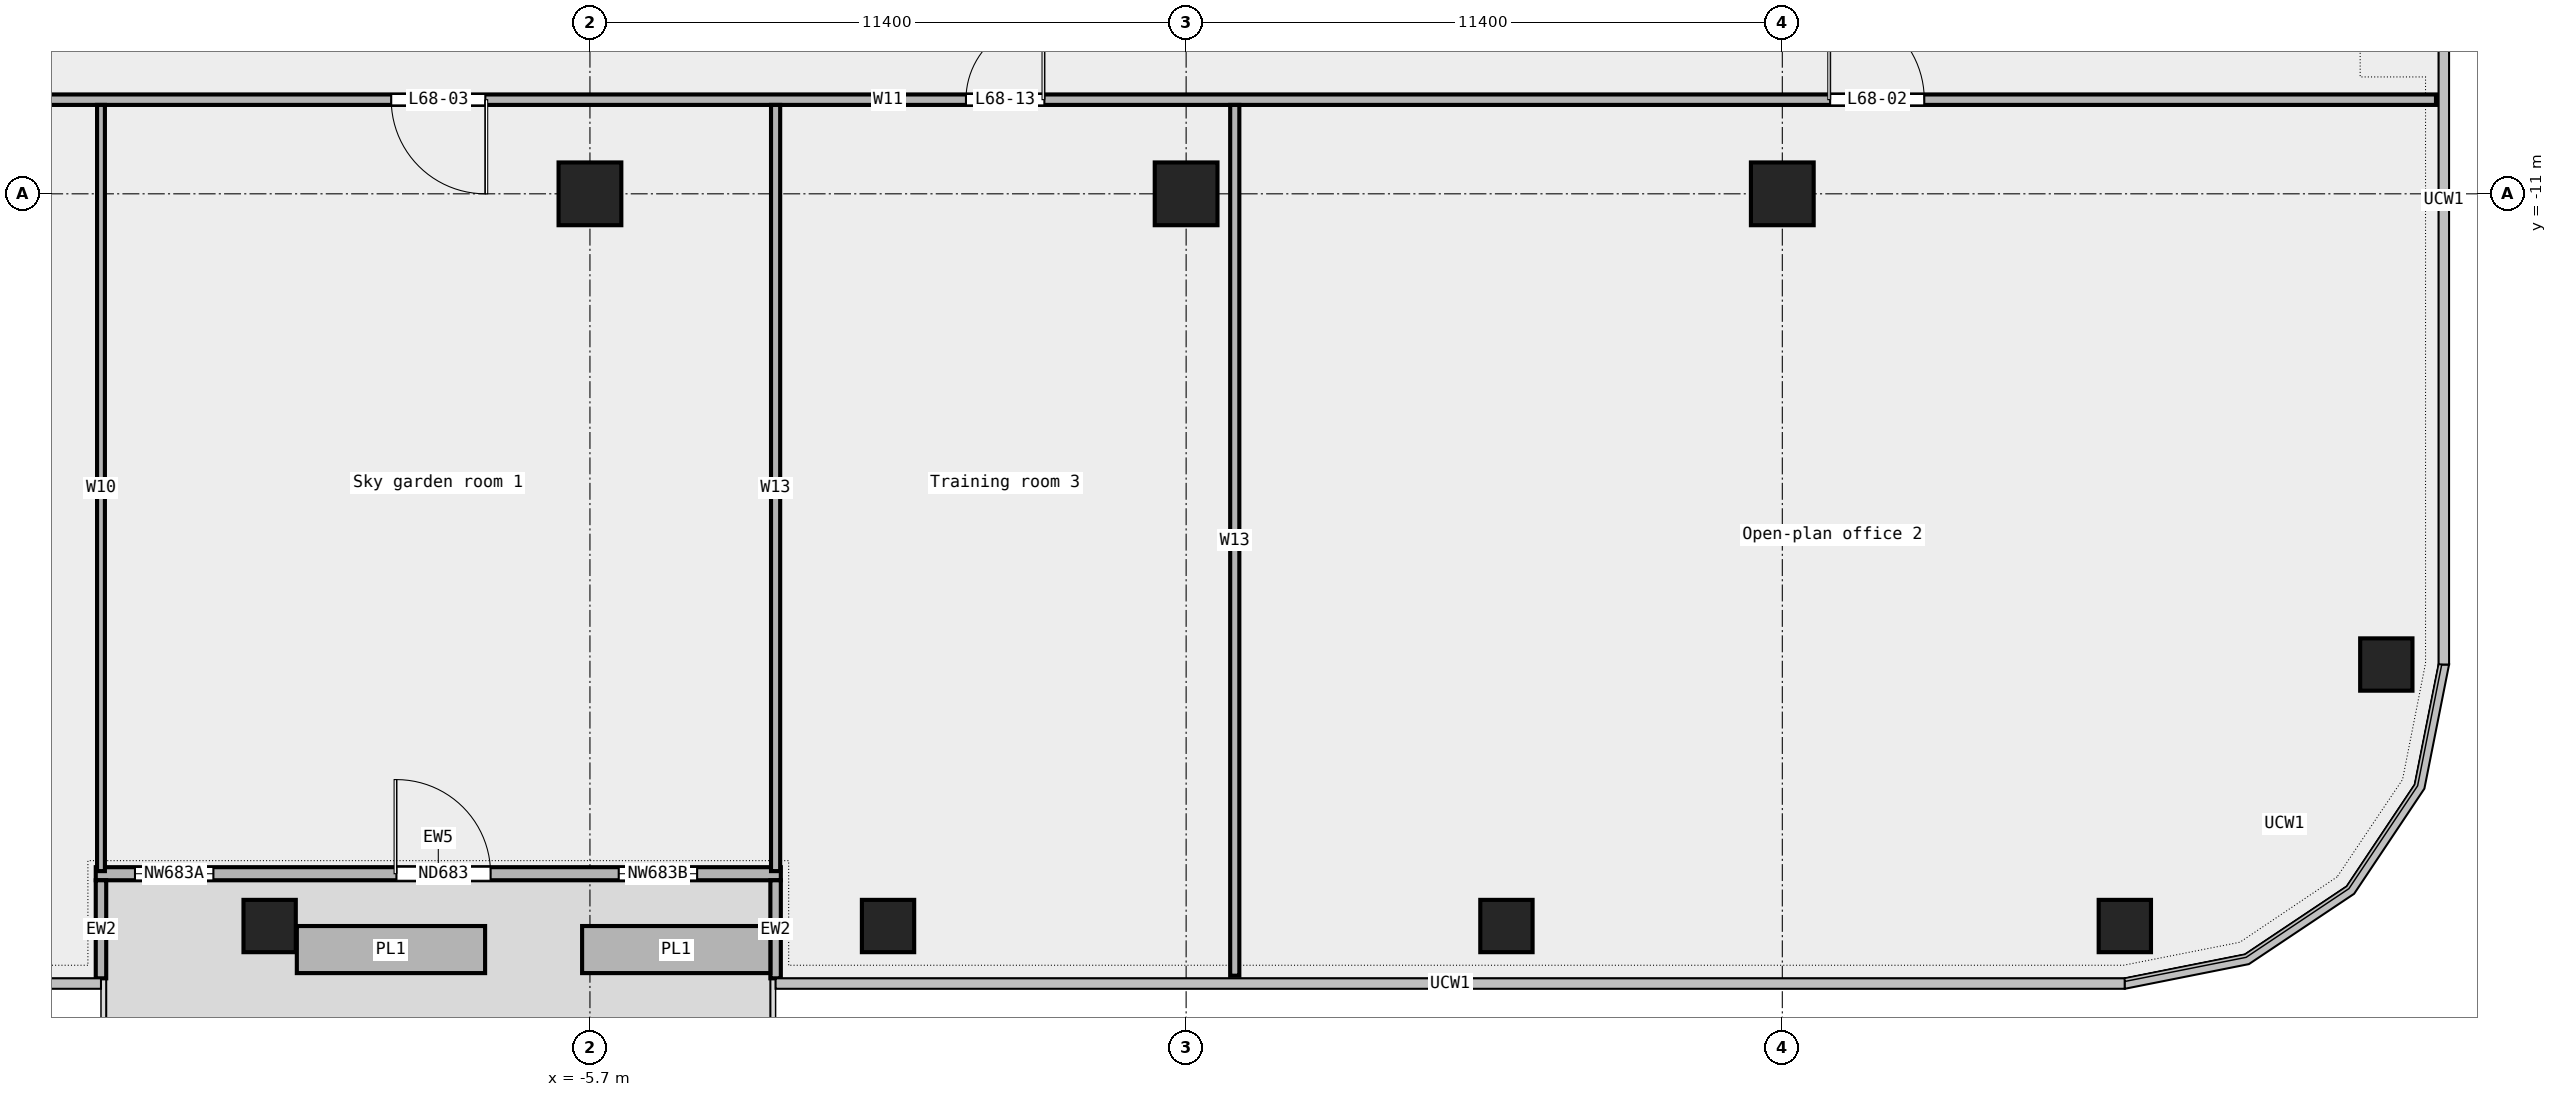
"""IFC4 building model, lengths in metres.
Left out: names, types, materials, properties, quantities, classifications, styles, units other than length and angle.
Written with IfcOpenShell. Run it as: python <this file> out.ifc"""

import sys

from ifc_helpers import new_model, si_unit, direction, frame, frame_2d, origin, origin_2d, place, context, subcontext, project, spatial, rectangle, extrude, element, fill, save


model = new_model("IFC4")
c1 = context("Model", 3, precision=1e-05, world=origin(), true_north=direction((0.0, 1.0)))
c2 = subcontext(c1, "Body", "Model", "MODEL_VIEW")
j1 = project(units=[si_unit("LENGTHUNIT", "METRE"), si_unit("PLANEANGLEUNIT", "RADIAN")], contexts=[c1])
p1 = place(None, origin())
s1 = spatial("IfcSite", under=j1, at=p1, CompositionType="ELEMENT")
p2 = place(p1, origin())
s2 = spatial("IfcBuilding", under=s1, at=p2, CompositionType="ELEMENT")
p3 = place(p2, frame((0.0, 0.0, 311.4)))
s3 = spatial("IfcBuildingStorey", under=s2, at=p3, CompositionType="ELEMENT", Elevation=311.4)
for number, where, z_axis, x_axis in (
    (1, (-11.825, -25.0, 0.0), (0.0, 0.0, 1.0), (1.0, 0.0, 0.0)),
    (2, (0.0, -25.0, 0.0), (0.0, 0.0, 1.0), (1.0, 0.0, 0.0)),
    (3, (11.825, -25.0, 0.0), (0.0, 0.0, 1.0), (1.0, 0.0, 0.0)),
    (4, (23.65, -25.0, 0.0), (0.0, 0.0, 1.0), (1.0, 0.0, 0.0)),
    (5, (28.65, -20.0, 0.0), (0.0, 0.0, 1.0), (1.0, 0.0, 0.0)),
):
    element("IfcColumn", number, at=place(p3, frame(where, z_axis=z_axis, x_axis=x_axis)), inside=s3, PredefinedType="COLUMN", context=c2, shape_type="SweptSolid", body=[
        extrude(rectangle(XDim=1.0, YDim=1.0, at=origin_2d()), origin(), (0.0, 0.0, 1.0), 3.4),
    ])
for number, where, z_axis, x_axis in (
    (6, (-5.7, -11.0, 0.0), (0.0, 0.0, 1.0), (1.0, 0.0, 0.0)),
    (7, (5.7, -11.0, 0.0), (0.0, 0.0, 1.0), (1.0, 0.0, 0.0)),
    (8, (17.1, -11.0, 0.0), (0.0, 0.0, 1.0), (1.0, 0.0, 0.0)),
):
    element("IfcColumn", number, at=place(p3, frame(where, z_axis=z_axis, x_axis=x_axis)), inside=s3, PredefinedType="COLUMN", context=c2, shape_type="SweptSolid", body=[
        extrude(rectangle(XDim=1.2, YDim=1.2, at=origin_2d()), origin(), (0.0, 0.0, 1.0), 3.4),
    ])
p4 = place(p3, frame((-15.15, -24.0, 0.0), z_axis=(0.0, 0.0, 1.0), x_axis=(1.0, 0.0, 0.0)))
e9 = element("IfcWall", 9, at=p4, inside=s3, PredefinedType="STANDARD", context=c2, shape_type="SweptSolid", body=[
    extrude(rectangle(XDim=13.1, YDim=0.25, at=frame_2d((6.55, 0.0))), origin(), (0.0, 0.0, 1.0), 3.4),
])
p5 = place(p4, frame((0.75, 0.0, 0.45)))
e10 = element("IfcOpeningElement", 10, at=p5, cuts=e9, PredefinedType="OPENING", context=c2, shape_type="SweptSolid", body=[
    extrude(rectangle(XDim=1.5, YDim=2.4, at=frame_2d((0.75, 1.2))), frame((0.0, 0.137, 0.0), z_axis=(0.0, -1.0, 0.0), x_axis=(1.0, 0.0, 0.0)), (0.0, 0.0, 1.0), 0.274),
])
p6 = place(p4, frame((5.75, 0.0, 0.0)))
e11 = element("IfcOpeningElement", 11, at=p6, cuts=e9, PredefinedType="OPENING", context=c2, shape_type="SweptSolid", body=[
    extrude(rectangle(XDim=1.8, YDim=2.4, at=frame_2d((0.9, 1.2))), frame((0.0, 0.137, 0.0), z_axis=(0.0, -1.0, 0.0), x_axis=(1.0, 0.0, 0.0)), (0.0, 0.0, 1.0), 0.274),
])
p7 = place(p4, frame((10.0, 0.0, 0.45)))
e12 = element("IfcOpeningElement", 12, at=p7, cuts=e9, PredefinedType="OPENING", context=c2, shape_type="SweptSolid", body=[
    extrude(rectangle(XDim=1.5, YDim=2.4, at=frame_2d((0.75, 1.2))), frame((0.0, 0.137, 0.0), z_axis=(0.0, -1.0, 0.0), x_axis=(1.0, 0.0, 0.0)), (0.0, 0.0, 1.0), 0.274),
])
for number, where, z_axis, x_axis in (
    (13, (-15.05, -26.0, 0.0), (0.0, 0.0, 1.0), (0.0, 1.0, 0.0)),
    (14, (-2.15, -26.0, 0.0), (0.0, 0.0, 1.0), (0.0, 1.0, 0.0)),
):
    element("IfcWall", number, at=place(p3, frame(where, z_axis=z_axis, x_axis=x_axis)), inside=s3, PredefinedType="STANDARD", context=c2, shape_type="SweptSolid", body=[
        extrude(rectangle(XDim=1.875, YDim=0.2, at=frame_2d((0.938, 0.0))), origin(), (0.0, 0.0, 1.0), 3.4),
    ])
for number, where, z_axis, x_axis in (
    (15, (-11.305, -25.45, 0.0), (0.0, 0.0, 1.0), (1.0, 0.0, 0.0)),
    (16, (-5.85, -25.45, 0.0), (0.0, 0.0, 1.0), (1.0, 0.0, 0.0)),
):
    element("IfcWall", number, at=place(p3, frame(where, z_axis=z_axis, x_axis=x_axis)), inside=s3, PredefinedType="STANDARD", context=c2, shape_type="SweptSolid", body=[
        extrude(rectangle(XDim=3.6, YDim=0.9, at=frame_2d((1.8, 0.0))), origin(), (0.0, 0.0, 1.0), 0.7),
    ])
p8 = place(p3, frame((-29.6, -9.2, 0.0), z_axis=(0.0, 0.0, 1.0), x_axis=(1.0, 0.0, 0.0)))
e17 = element("IfcWall", 17, at=p8, inside=s3, PredefinedType="PARTITIONING", context=c2, shape_type="SweptSolid", body=[
    extrude(rectangle(XDim=59.2, YDim=0.2, at=frame_2d((29.6, 0.0))), origin(), (0.0, 0.0, 1.0), 3.4),
])
p9 = place(p8, frame((47.615, 0.0, 0.0)))
e18 = element("IfcOpeningElement", 18, at=p9, cuts=e17, PredefinedType="OPENING", context=c2, shape_type="SweptSolid", body=[
    extrude(rectangle(XDim=1.8, YDim=2.1, at=frame_2d((0.9, 1.05))), frame((0.0, 0.112, 0.0), z_axis=(0.0, -1.0, 0.0), x_axis=(1.0, 0.0, 0.0)), (0.0, 0.0, 1.0), 0.224),
])
p10 = place(p8, frame((20.1, 0.0, 0.0)))
e19 = element("IfcOpeningElement", 19, at=p10, cuts=e17, PredefinedType="OPENING", context=c2, shape_type="SweptSolid", body=[
    extrude(rectangle(XDim=1.8, YDim=2.1, at=frame_2d((0.9, 1.05))), frame((0.0, 0.112, 0.0), z_axis=(0.0, -1.0, 0.0), x_axis=(1.0, 0.0, 0.0)), (0.0, 0.0, 1.0), 0.224),
])
p11 = place(p8, frame((6.475, 0.0, 0.0)))
e20 = element("IfcOpeningElement", 20, at=p11, cuts=e17, PredefinedType="OPENING", context=c2, shape_type="SweptSolid", body=[
    extrude(rectangle(XDim=1.8, YDim=2.1, at=frame_2d((0.9, 1.05))), frame((0.0, 0.112, 0.0), z_axis=(0.0, -1.0, 0.0), x_axis=(1.0, 0.0, 0.0)), (0.0, 0.0, 1.0), 0.224),
])
p12 = place(p8, frame((31.09, 0.0, 0.0)))
e21 = element("IfcOpeningElement", 21, at=p12, cuts=e17, PredefinedType="OPENING", context=c2, shape_type="SweptSolid", body=[
    extrude(rectangle(XDim=1.5, YDim=2.1, at=frame_2d((0.75, 1.05))), frame((0.0, 0.112, 0.0), z_axis=(0.0, -1.0, 0.0), x_axis=(1.0, 0.0, 0.0)), (0.0, 0.0, 1.0), 0.224),
])
p13 = place(p3, frame((-15.05, -23.95, 0.0), z_axis=(0.0, 0.0, 1.0), x_axis=(0.0, 1.0, 0.0)))
e22 = element("IfcWall", 22, at=p13, inside=s3, PredefinedType="PARTITIONING", context=c2, shape_type="SweptSolid", body=[
    extrude(rectangle(XDim=14.65, YDim=0.15, at=frame_2d((7.325, 0.0))), origin(), (0.0, 0.0, 1.0), 3.4),
])
p14 = place(p3, frame((-2.15, -23.95, 0.0), z_axis=(0.0, 0.0, 1.0), x_axis=(0.0, 1.0, 0.0)))
e23 = element("IfcWall", 23, at=p14, inside=s3, PredefinedType="PARTITIONING", context=c2, shape_type="SweptSolid", body=[
    extrude(rectangle(XDim=14.65, YDim=0.175, at=frame_2d((7.325, 0.0))), origin(), (0.0, 0.0, 1.0), 3.4),
])
p15 = place(p3, frame((6.63, -25.95, 0.0), z_axis=(0.0, 0.0, 1.0), x_axis=(0.0, 1.0, 0.0)))
e24 = element("IfcWall", 24, at=p15, inside=s3, PredefinedType="PARTITIONING", context=c2, shape_type="SweptSolid", body=[
    extrude(rectangle(XDim=16.65, YDim=0.175, at=frame_2d((8.325, 0.0))), origin(), (0.0, 0.0, 1.0), 3.4),
])
p16 = place(p5, origin())
e25 = element("IfcWindow", 25, at=p16, inside=s3, PartitioningType="SINGLE_PANEL", PredefinedType="WINDOW", context=c2, shape_type="SweptSolid", body=[
    extrude(rectangle(XDim=1.5, YDim=2.4, at=frame_2d((0.75, 1.2))), frame((0.0, 0.03, 0.0), z_axis=(0.0, -1.0, 0.0), x_axis=(1.0, 0.0, 0.0)), (0.0, 0.0, 1.0), 0.06),
])
fill(e10, e25)
p17 = place(p6, origin())
e26 = element("IfcDoor", 26, at=p17, inside=s3, OperationType="DOUBLE_DOOR_SINGLE_SWING", PredefinedType="DOOR", context=c2, shape_type="SweptSolid", body=[
    extrude(rectangle(XDim=1.8, YDim=2.4, at=frame_2d((0.9, 1.2))), frame((0.0, 0.025, 0.0), z_axis=(0.0, -1.0, 0.0), x_axis=(1.0, 0.0, 0.0)), (0.0, 0.0, 1.0), 0.05),
])
fill(e11, e26)
p18 = place(p7, origin())
e27 = element("IfcWindow", 27, at=p18, inside=s3, PartitioningType="SINGLE_PANEL", PredefinedType="WINDOW", context=c2, shape_type="SweptSolid", body=[
    extrude(rectangle(XDim=1.5, YDim=2.4, at=frame_2d((0.75, 1.2))), frame((0.0, 0.03, 0.0), z_axis=(0.0, -1.0, 0.0), x_axis=(1.0, 0.0, 0.0)), (0.0, 0.0, 1.0), 0.06),
])
fill(e12, e27)
p19 = place(p9, origin())
e28 = element("IfcDoor", 28, at=p19, inside=s3, OperationType="DOUBLE_DOOR_SINGLE_SWING", PredefinedType="DOOR", context=c2, shape_type="SweptSolid", body=[
    extrude(rectangle(XDim=1.8, YDim=2.1, at=frame_2d((0.9, 1.05))), frame((0.0, 0.025, 0.0), z_axis=(0.0, -1.0, 0.0), x_axis=(1.0, 0.0, 0.0)), (0.0, 0.0, 1.0), 0.05),
])
fill(e18, e28)
p20 = place(p10, origin())
e29 = element("IfcDoor", 29, at=p20, inside=s3, OperationType="DOUBLE_DOOR_SINGLE_SWING", PredefinedType="DOOR", context=c2, shape_type="SweptSolid", body=[
    extrude(rectangle(XDim=1.8, YDim=2.1, at=frame_2d((0.9, 1.05))), frame((0.0, 0.025, 0.0), z_axis=(0.0, -1.0, 0.0), x_axis=(1.0, 0.0, 0.0)), (0.0, 0.0, 1.0), 0.05),
])
fill(e19, e29)
p21 = place(p12, origin())
e30 = element("IfcDoor", 30, at=p21, inside=s3, OperationType="DOUBLE_DOOR_SINGLE_SWING", PredefinedType="DOOR", context=c2, shape_type="SweptSolid", body=[
    extrude(rectangle(XDim=1.5, YDim=2.1, at=frame_2d((0.75, 1.05))), frame((0.0, 0.025, 0.0), z_axis=(0.0, -1.0, 0.0), x_axis=(1.0, 0.0, 0.0)), (0.0, 0.0, 1.0), 0.05),
])
fill(e21, e30)
save(model, sys.argv[1])
